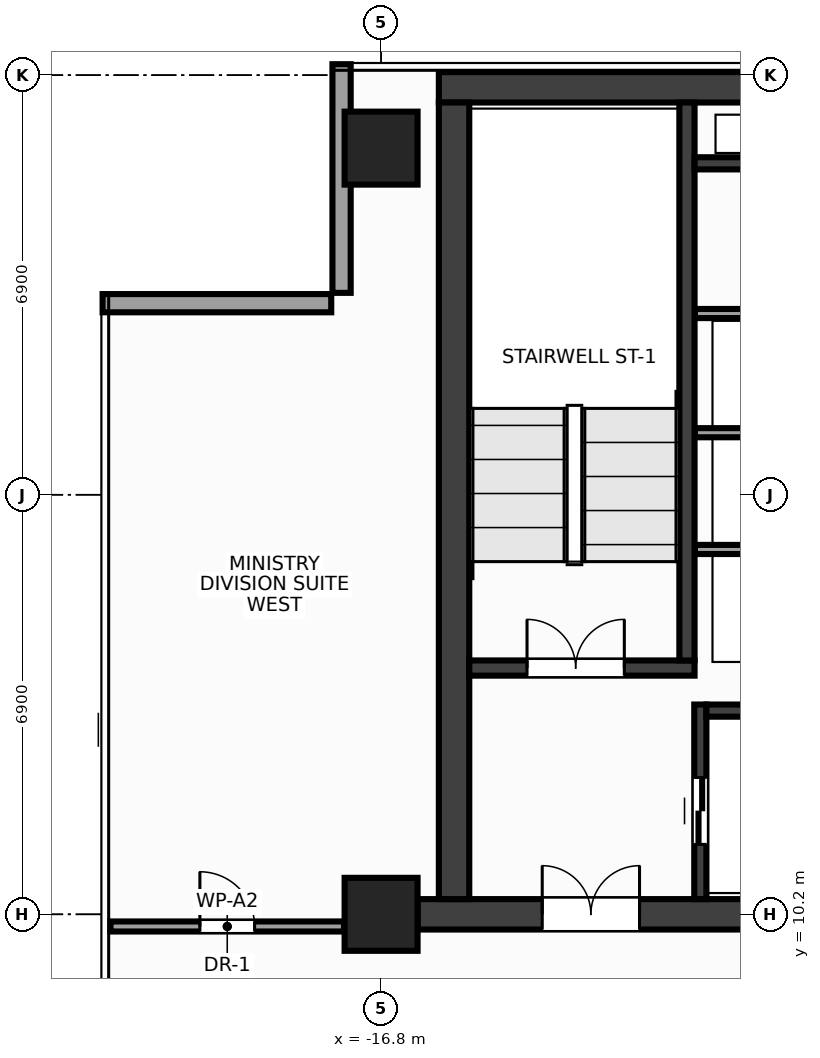
"""IFC4 building model, lengths in metres.
Left out: names, types, materials, properties, quantities, classifications, styles, units other than length and angle.
Written with IfcOpenShell. Run it as: python <this file> out.ifc"""

import sys

from ifc_helpers import new_model, si_unit, direction, frame, frame_2d, origin, origin_2d, place, context, subcontext, project, spatial, rectangle, extrude, source, transform, mapped, element, fill, save


model = new_model("IFC4")
c1 = context("Model", 3, precision=1e-05, world=origin(), true_north=direction((0.0, 1.0)))
c2 = subcontext(c1, "Body", "Model", "MODEL_VIEW")
j1 = project(units=[si_unit("LENGTHUNIT", "METRE"), si_unit("PLANEANGLEUNIT", "RADIAN")], contexts=[c1])
p1 = place(None, origin())
s1 = spatial("IfcSite", under=j1, at=p1, CompositionType="ELEMENT")
p2 = place(p1, origin())
s2 = spatial("IfcBuilding", under=s1, at=p2, CompositionType="ELEMENT")
p3 = place(p2, frame((0.0, 0.0, 286.4)))
s3 = spatial("IfcBuildingStorey", under=s2, at=p3, CompositionType="ELEMENT", Elevation=286.4)
m1 = source(origin(), c2, "Body", "SweptSolid", [
    extrude(rectangle(XDim=31.7, YDim=0.5, at=frame_2d((15.85, 0.0))), origin(), (0.0, 0.0, 1.0), 3.6),
])
p4 = place(p3, frame((-15.85, 23.8, 0.0), z_axis=(0.0, 0.0, 1.0), x_axis=(1.0, 0.0, 0.0)))
e1 = element("IfcWall", 1, at=p4, inside=s3, PredefinedType="SHEAR", context=c2, shape_type="MappedRepresentation", body=[
    mapped(m1, transform((0.0, 0.0, 0.0), x_axis=(1.0, 0.0, 0.0), y_axis=(0.0, 1.0, 0.0), z_axis=(0.0, 0.0, 1.0), scale=1.0)),
])
m2 = source(origin(), c2, "Body", "SweptSolid", [
    extrude(rectangle(XDim=32.4, YDim=0.5, at=frame_2d((16.2, 0.0))), origin(), (0.0, 0.0, 1.0), 3.6),
])
p5 = place(p3, frame((-16.2, 10.2, 0.0), z_axis=(0.0, 0.0, 1.0), x_axis=(1.0, 0.0, 0.0)))
e2 = element("IfcWall", 2, at=p5, inside=s3, PredefinedType="SHEAR", context=c2, shape_type="MappedRepresentation", body=[
    mapped(m2, transform((0.0, 0.0, 0.0), x_axis=(1.0, 0.0, 0.0), y_axis=(0.0, 1.0, 0.0), z_axis=(0.0, 0.0, 1.0), scale=1.0)),
])
p6 = place(p5, frame((2.05, 0.0, 0.0)))
e3 = element("IfcOpeningElement", 3, at=p6, cuts=e2, PredefinedType="OPENING", context=c2, shape_type="SweptSolid", body=[
    extrude(rectangle(XDim=1.6, YDim=2.15, at=frame_2d((0.8, 1.075))), frame((0.0, 0.262, 0.0), z_axis=(0.0, -1.0, 0.0), x_axis=(1.0, 0.0, 0.0)), (0.0, 0.0, 1.0), 0.524),
])
p7 = place(p5, frame((28.75, 0.0, 0.0)))
e4 = element("IfcOpeningElement", 4, at=p7, cuts=e2, PredefinedType="OPENING", context=c2, shape_type="SweptSolid", body=[
    extrude(rectangle(XDim=1.6, YDim=2.15, at=frame_2d((0.8, 1.075))), frame((0.0, 0.262, 0.0), z_axis=(0.0, -1.0, 0.0), x_axis=(1.0, 0.0, 0.0)), (0.0, 0.0, 1.0), 0.524),
])
p8 = place(p5, frame((15.45, 0.0, 0.0)))
e5 = element("IfcOpeningElement", 5, at=p8, cuts=e2, PredefinedType="OPENING", context=c2, shape_type="SweptSolid", body=[
    extrude(rectangle(XDim=1.5, YDim=2.2, at=frame_2d((0.75, 1.1))), frame((0.0, 0.262, 0.0), z_axis=(0.0, -1.0, 0.0), x_axis=(1.0, 0.0, 0.0)), (0.0, 0.0, 1.0), 0.524),
])
m3 = source(origin(), c2, "Body", "SweptSolid", [
    extrude(rectangle(XDim=13.1, YDim=0.5, at=frame_2d((6.55, 0.0))), origin(), (0.0, 0.0, 1.0), 3.6),
])
p9 = place(p3, frame((-15.6, 10.45, 0.0), z_axis=(0.0, 0.0, 1.0), x_axis=(0.0, 1.0, 0.0)))
e6 = element("IfcWall", 6, at=p9, inside=s3, PredefinedType="SHEAR", context=c2, shape_type="MappedRepresentation", body=[
    mapped(m3, transform((0.0, 0.0, 0.0), x_axis=(1.0, 0.0, 0.0), y_axis=(0.0, 1.0, 0.0), z_axis=(0.0, 0.0, 1.0), scale=1.0)),
])
m4 = source(origin(), c2, "Body", "SweptSolid", [
    extrude(rectangle(XDim=3.705, YDim=0.25, at=frame_2d((1.853, 0.0))), origin(), (0.0, 0.0, 1.0), 3.6),
])
p10 = place(p3, frame((-15.35, 14.25, 0.0), z_axis=(0.0, 0.0, 1.0), x_axis=(1.0, 0.0, 0.0)))
e7 = element("IfcWall", 7, at=p10, inside=s3, PredefinedType="SHEAR", context=c2, shape_type="MappedRepresentation", body=[
    mapped(m4, transform((0.0, 0.0, 0.0), x_axis=(1.0, 0.0, 0.0), y_axis=(0.0, 1.0, 0.0), z_axis=(0.0, 0.0, 1.0), scale=1.0)),
])
p11 = place(p10, frame((0.95, 0.0, 0.0)))
e8 = element("IfcOpeningElement", 8, at=p11, cuts=e7, PredefinedType="OPENING", context=c2, shape_type="SweptSolid", body=[
    extrude(rectangle(XDim=1.6, YDim=2.15, at=frame_2d((0.8, 1.075))), frame((0.0, 0.137, 0.0), z_axis=(0.0, -1.0, 0.0), x_axis=(1.0, 0.0, 0.0)), (0.0, 0.0, 1.0), 0.274),
])
m5 = source(origin(), c2, "Body", "SweptSolid", [
    extrude(rectangle(XDim=9.175, YDim=0.25, at=frame_2d((4.587, 0.0))), origin(), (0.0, 0.0, 1.0), 3.6),
])
p12 = place(p3, frame((-11.77, 14.375, 0.0), z_axis=(0.0, 0.0, 1.0), x_axis=(0.0, 1.0, 0.0)))
e9 = element("IfcWall", 9, at=p12, inside=s3, PredefinedType="SHEAR", context=c2, shape_type="MappedRepresentation", body=[
    mapped(m5, transform((0.0, 0.0, 0.0), x_axis=(1.0, 0.0, 0.0), y_axis=(0.0, 1.0, 0.0), z_axis=(0.0, 0.0, 1.0), scale=1.0)),
])
m6 = source(origin(), c2, "Body", "SweptSolid", [
    extrude(rectangle(XDim=3.2, YDim=0.2, at=frame_2d((1.6, 0.0))), origin(), (0.0, 0.0, 1.0), 3.6),
])
p13 = place(p3, frame((-11.55, 10.45, 0.0), z_axis=(0.0, 0.0, 1.0), x_axis=(0.0, 1.0, 0.0)))
e10 = element("IfcWall", 10, at=p13, inside=s3, PredefinedType="SHEAR", context=c2, shape_type="MappedRepresentation", body=[
    mapped(m6, transform((0.0, 0.0, 0.0), x_axis=(1.0, 0.0, 0.0), y_axis=(0.0, 1.0, 0.0), z_axis=(0.0, 0.0, 1.0), scale=1.0)),
])
p14 = place(p13, frame((0.9, 0.0, 0.0)))
e11 = element("IfcOpeningElement", 11, at=p14, cuts=e10, PredefinedType="OPENING", context=c2, shape_type="SweptSolid", body=[
    extrude(rectangle(XDim=1.1, YDim=2.15, at=frame_2d((0.55, 1.075))), frame((0.0, 0.112, 0.0), z_axis=(0.0, -1.0, 0.0), x_axis=(1.0, 0.0, 0.0)), (0.0, 0.0, 1.0), 0.224),
])
m7 = source(origin(), c2, "Body", "SweptSolid", [
    extrude(rectangle(XDim=2.825, YDim=0.2, at=frame_2d((1.413, 0.0))), origin(), (0.0, 0.0, 1.0), 3.6),
])
p15 = place(p3, frame((-11.45, 13.55, 0.0), z_axis=(0.0, 0.0, 1.0), x_axis=(1.0, 0.0, 0.0)))
e12 = element("IfcWall", 12, at=p15, inside=s3, PredefinedType="SHEAR", context=c2, shape_type="MappedRepresentation", body=[
    mapped(m7, transform((0.0, 0.0, 0.0), x_axis=(1.0, 0.0, 0.0), y_axis=(0.0, 1.0, 0.0), z_axis=(0.0, 0.0, 1.0), scale=1.0)),
])
m8 = source(origin(), c2, "Body", "SweptSolid", [
    extrude(rectangle(XDim=3.02, YDim=0.2, at=frame_2d((1.51, 0.0))), origin(), (0.0, 0.0, 1.0), 3.6),
])
p16 = place(p3, frame((-11.645, 22.55, 0.0), z_axis=(0.0, 0.0, 1.0), x_axis=(1.0, 0.0, 0.0)))
e13 = element("IfcWall", 13, at=p16, inside=s3, PredefinedType="SHEAR", context=c2, shape_type="MappedRepresentation", body=[
    mapped(m8, transform((0.0, 0.0, 0.0), x_axis=(1.0, 0.0, 0.0), y_axis=(0.0, 1.0, 0.0), z_axis=(0.0, 0.0, 1.0), scale=1.0)),
])
m9 = source(origin(), c2, "Body", "SweptSolid", [
    extrude(rectangle(XDim=1.2, YDim=1.2, at=origin_2d()), origin(), (0.0, 0.0, 1.0), 3.6),
])
for number, where, z_axis, x_axis in (
    (14, (-16.8, 10.2, 0.0), (0.0, 0.0, 1.0), (1.0, 0.0, 0.0)),
    (15, (-16.8, 22.8, 0.0), (0.0, 0.0, 1.0), (1.0, 0.0, 0.0)),
):
    element("IfcColumn", number, at=place(p3, frame(where, z_axis=z_axis, x_axis=x_axis)), inside=s3, PredefinedType="COLUMN", context=c2, shape_type="MappedRepresentation", body=[
        mapped(m9, transform((0.0, 0.0, 0.0), x_axis=(1.0, 0.0, 0.0), y_axis=(0.0, 1.0, 0.0), z_axis=(0.0, 0.0, 1.0), scale=1.0)),
    ])
m10 = source(origin(), c2, "Body", "SweptSolid", [
    extrude(rectangle(XDim=3.76, YDim=0.3, at=frame_2d((1.88, 0.0))), origin(), (0.0, 0.0, 1.0), 2.75),
])
p17 = place(p3, frame((-17.45, 24.18, 0.0), z_axis=(0.0, 0.0, 1.0), x_axis=(0.0, -1.0, 0.0)))
e16 = element("IfcWall", 16, at=p17, inside=s3, PredefinedType="STANDARD", context=c2, shape_type="MappedRepresentation", body=[
    mapped(m10, transform((0.0, 0.0, 0.0), x_axis=(1.0, 0.0, 0.0), y_axis=(0.0, 1.0, 0.0), z_axis=(0.0, 0.0, 1.0), scale=1.0)),
])
m11 = source(origin(), c2, "Body", "SweptSolid", [
    extrude(rectangle(XDim=3.76, YDim=0.3, at=frame_2d((1.88, 0.0))), origin(), (0.0, 0.0, 1.0), 2.75),
])
p18 = place(p3, frame((-17.62, 20.25, 0.0), z_axis=(0.0, 0.0, 1.0), x_axis=(-1.0, 0.0, 0.0)))
e17 = element("IfcWall", 17, at=p18, inside=s3, PredefinedType="STANDARD", context=c2, shape_type="MappedRepresentation", body=[
    mapped(m11, transform((0.0, 0.0, 0.0), x_axis=(1.0, 0.0, 0.0), y_axis=(0.0, 1.0, 0.0), z_axis=(0.0, 0.0, 1.0), scale=1.0)),
])
m12 = source(origin(), c2, "Body", "SweptSolid", [
    extrude(rectangle(XDim=3.01, YDim=0.15, at=frame_2d((1.505, 0.0))), origin(), (0.0, 0.0, 1.0), 3.37),
])
for number, where, z_axis, x_axis in (
    (18, (-11.64, 16.2, 0.0), (0.0, 0.0, 1.0), (1.0, 0.0, 0.0)),
    (19, (-11.64, 18.12, 0.0), (0.0, 0.0, 1.0), (1.0, 0.0, 0.0)),
    (20, (-11.64, 20.08, 0.0), (0.0, 0.0, 1.0), (1.0, 0.0, 0.0)),
):
    element("IfcWall", number, at=place(p3, frame(where, z_axis=z_axis, x_axis=x_axis)), inside=s3, PredefinedType="PARTITIONING", context=c2, shape_type="MappedRepresentation", body=[
        mapped(m12, transform((0.0, 0.0, 0.0), x_axis=(1.0, 0.0, 0.0), y_axis=(0.0, 1.0, 0.0), z_axis=(0.0, 0.0, 1.0), scale=1.0)),
    ])
m13 = source(origin(), c2, "Body", "SweptSolid", [
    extrude(rectangle(XDim=3.84, YDim=0.165, at=frame_2d((1.92, 0.0))), origin(), (0.0, 0.0, 1.0), 2.805),
])
p19 = place(p3, frame((-21.25, 10.0, 0.0), z_axis=(0.0, 0.0, 1.0), x_axis=(1.0, 0.0, 0.0)))
e21 = element("IfcWall", 21, at=p19, inside=s3, PredefinedType="PARTITIONING", context=c2, shape_type="MappedRepresentation", body=[
    mapped(m13, transform((0.0, 0.0, 0.0), x_axis=(1.0, 0.0, 0.0), y_axis=(0.0, 1.0, 0.0), z_axis=(0.0, 0.0, 1.0), scale=1.0)),
])
p20 = place(p19, frame((1.47, 0.0, 0.0)))
e22 = element("IfcOpeningElement", 22, at=p20, cuts=e21, PredefinedType="OPENING", context=c2, shape_type="SweptSolid", body=[
    extrude(rectangle(XDim=0.9, YDim=2.15, at=frame_2d((0.45, 1.075))), frame((0.0, 0.094, 0.0), z_axis=(0.0, -1.0, 0.0), x_axis=(1.0, 0.0, 0.0)), (0.0, 0.0, 1.0), 0.189),
])
m14 = source(origin(), c2, "Body", "SweptSolid", [
    extrude(rectangle(XDim=1.6, YDim=2.15, at=frame_2d((0.8, 1.075))), frame((0.0, 0.025, 0.0), z_axis=(0.0, -1.0, 0.0), x_axis=(1.0, 0.0, 0.0)), (0.0, 0.0, 1.0), 0.05),
])
p21 = place(p11, origin())
e23 = element("IfcDoor", 23, at=p21, inside=s3, OperationType="DOUBLE_DOOR_SINGLE_SWING", PredefinedType="DOOR", context=c2, shape_type="MappedRepresentation", body=[
    mapped(m14, transform((0.0, 0.0, 0.0), x_axis=(1.0, 0.0, 0.0), y_axis=(0.0, 1.0, 0.0), z_axis=(0.0, 0.0, 1.0), scale=1.0)),
])
fill(e8, e23)
p22 = place(p6, origin())
e24 = element("IfcDoor", 24, at=p22, inside=s3, OperationType="DOUBLE_DOOR_SINGLE_SWING", PredefinedType="DOOR", context=c2, shape_type="MappedRepresentation", body=[
    mapped(m14, transform((0.0, 0.0, 0.0), x_axis=(1.0, 0.0, 0.0), y_axis=(0.0, 1.0, 0.0), z_axis=(0.0, 0.0, 1.0), scale=1.0)),
])
fill(e3, e24)
m15 = source(origin(), c2, "Body", "SweptSolid", [
    extrude(rectangle(XDim=1.1, YDim=2.15, at=frame_2d((0.55, 1.075))), frame((0.0, 0.025, 0.0), z_axis=(0.0, -1.0, 0.0), x_axis=(1.0, 0.0, 0.0)), (0.0, 0.0, 1.0), 0.05),
])
p23 = place(p14, origin())
e25 = element("IfcDoor", 25, at=p23, inside=s3, OperationType="DOUBLE_DOOR_SLIDING", PredefinedType="DOOR", context=c2, shape_type="MappedRepresentation", body=[
    mapped(m15, transform((0.0, 0.0, 0.0), x_axis=(1.0, 0.0, 0.0), y_axis=(0.0, 1.0, 0.0), z_axis=(0.0, 0.0, 1.0), scale=1.0)),
])
fill(e11, e25)
m16 = source(origin(), c2, "Body", "SweptSolid", [
    extrude(rectangle(XDim=0.9, YDim=2.15, at=frame_2d((0.45, 1.075))), frame((0.0, 0.025, 0.0), z_axis=(0.0, -1.0, 0.0), x_axis=(1.0, 0.0, 0.0)), (0.0, 0.0, 1.0), 0.05),
])
p24 = place(p20, origin())
e26 = element("IfcDoor", 26, at=p24, inside=s3, OperationType="SINGLE_SWING_LEFT", PredefinedType="DOOR", context=c2, shape_type="MappedRepresentation", body=[
    mapped(m16, transform((0.0, 0.0, 0.0), x_axis=(1.0, 0.0, 0.0), y_axis=(0.0, 1.0, 0.0), z_axis=(0.0, 0.0, 1.0), scale=1.0)),
])
fill(e22, e26)
save(model, sys.argv[1])
